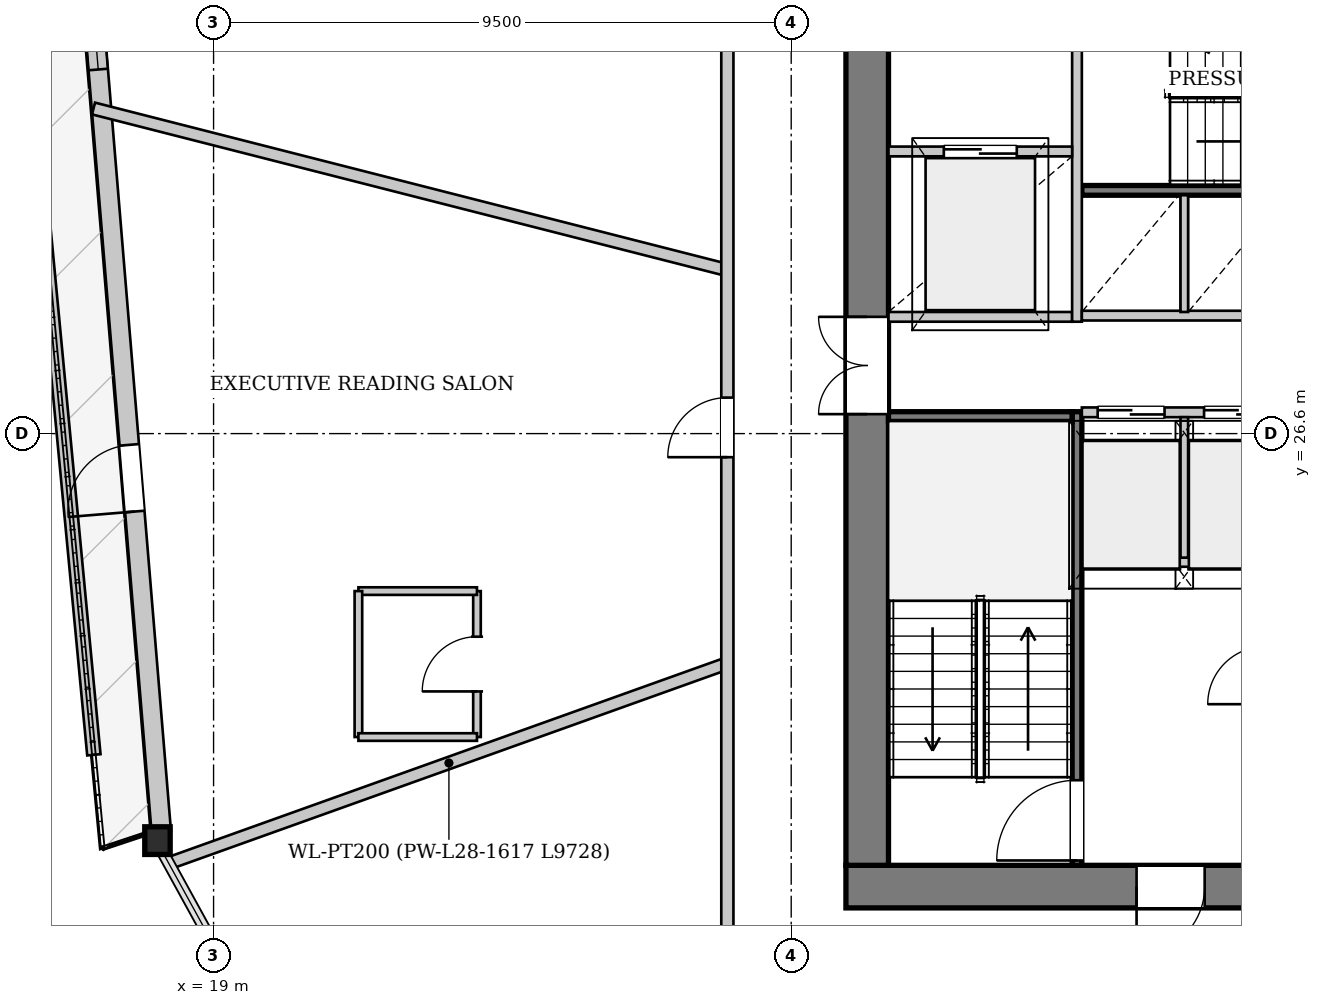
"""IFC4 building model, lengths in metres.
Left out: names, types, materials, properties, quantities, classifications, styles, units other than length and angle.
Written with IfcOpenShell. Run it as: python <this file> out.ifc"""

import sys

from ifc_helpers import new_model, si_unit, direction, frame, frame_2d, origin, origin_2d, place, context, subcontext, project, spatial, rectangle, i_section, extrude, source, transform, mapped, element, fill, save


model = new_model("IFC4")
c1 = context("Model", 3, precision=1e-05, world=origin(), true_north=direction((0.0, 1.0)))
c2 = subcontext(c1, "Body", "Model", "MODEL_VIEW")
j1 = project(units=[si_unit("LENGTHUNIT", "METRE"), si_unit("PLANEANGLEUNIT", "RADIAN")], contexts=[c1])
p1 = place(None, origin())
s1 = spatial("IfcSite", under=j1, at=p1, CompositionType="ELEMENT")
p2 = place(p1, origin())
s2 = spatial("IfcBuilding", under=s1, at=p2, CompositionType="ELEMENT")
p3 = place(p2, frame((0.0, 0.0, 109.25)))
s3 = spatial("IfcBuildingStorey", under=s2, at=p3, CompositionType="ELEMENT", Elevation=109.25)
m1 = source(origin(), c2, "Body", "SweptSolid", [
    extrude(i_section(OverallWidth=0.418, OverallDepth=0.455, WebThickness=0.038, FlangeThickness=0.059, at=origin_2d()), origin(), (0.0, 0.0, 1.0), 3.403),
])
p4 = place(p3, frame((17.98, 20.048, 0.0), z_axis=(0.057259482904, -0.083449597264, 0.994865577017), x_axis=(0.824558750738, 0.565776339715, 0.0)))
e1 = element("IfcColumn", 1, at=p4, inside=s3, PredefinedType="COLUMN", context=c2, shape_type="MappedRepresentation", body=[
    mapped(m1, transform((0.0, 0.0, 0.0), x_axis=(1.0, 0.0, 0.0), y_axis=(0.0, 1.0, 0.0), z_axis=(0.0, 0.0, 1.0), scale=1.0)),
])
p5 = place(p3, frame((18.139, 20.062, 0.0), z_axis=(0.0, 0.0, 1.0), x_axis=(-0.082462696948, 0.996594151905, 0.0)))
e2 = element("IfcWall", 2, at=p5, inside=s3, PredefinedType="SOLIDWALL", context=c2, shape_type="SweptSolid", body=[
    extrude(rectangle(XDim=18.202, YDim=0.32, at=frame_2d((9.101, 0.0))), origin(), (0.0, 0.0, 1.0), 2.692),
])
p6 = place(p5, frame((5.275, 0.0, 0.0)))
e3 = element("IfcOpeningElement", 3, at=p6, cuts=e2, PredefinedType="OPENING", context=c2, shape_type="SweptSolid", body=[
    extrude(rectangle(XDim=1.1, YDim=2.3, at=frame_2d((0.55, 1.15))), frame((0.0, 0.17, 0.0), z_axis=(0.0, -1.0, 0.0), x_axis=(1.0, 0.0, 0.0)), (0.0, 0.0, 1.0), 0.34),
])
p7 = place(p5, frame((12.569, 0.0, 0.372)))
e4 = element("IfcOpeningElement", 4, at=p7, cuts=e2, PredefinedType="OPENING", context=c2, shape_type="SweptSolid", body=[
    extrude(rectangle(XDim=1.8, YDim=2.2, at=frame_2d((0.9, 1.1))), frame((0.0, 0.17, 0.0), z_axis=(0.0, -1.0, 0.0), x_axis=(1.0, 0.0, 0.0)), (0.0, 0.0, 1.0), 0.34),
])
p8 = place(p3, frame((15.501, 37.451, 0.0), z_axis=(0.0, 0.0, 1.0), x_axis=(0.094440121339, -0.995530543721, 0.0)))
e5 = element("IfcWall", 5, at=p8, inside=s3, PredefinedType="PARAPET", context=c2, shape_type="SweptSolid", body=[
    extrude(rectangle(XDim=16.206, YDim=0.22, at=frame_2d((8.103, 0.0))), origin(), (0.0, 0.0, 1.0), 0.3),
])
p9 = place(p3, frame((46.6, 19.15, 0.0), z_axis=(0.0, 0.0, 1.0), x_axis=(-1.0, 0.0, 0.0)))
e6 = element("IfcWall", 6, at=p9, inside=s3, PredefinedType="SHEAR", context=c2, shape_type="SweptSolid", body=[
    extrude(rectangle(XDim=17.2, YDim=0.7, at=frame_2d((8.6, 0.0))), origin(), (0.0, 0.0, 1.0), 3.3),
])
p10 = place(p9, frame((4.8, 0.0, 0.0)))
e7 = element("IfcOpeningElement", 7, at=p10, cuts=e6, PredefinedType="OPENING", context=c2, shape_type="SweptSolid", body=[
    extrude(rectangle(XDim=1.12, YDim=2.25, at=frame_2d((0.56, 1.125))), frame((0.0, 0.36, 0.0), z_axis=(0.0, -1.0, 0.0), x_axis=(1.0, 0.0, 0.0)), (0.0, 0.0, 1.0), 0.72),
])
p11 = place(p9, frame((11.3, 0.0, 0.0)))
e8 = element("IfcOpeningElement", 8, at=p11, cuts=e6, PredefinedType="OPENING", context=c2, shape_type="SweptSolid", body=[
    extrude(rectangle(XDim=1.12, YDim=2.25, at=frame_2d((0.56, 1.125))), frame((0.0, 0.36, 0.0), z_axis=(0.0, -1.0, 0.0), x_axis=(1.0, 0.0, 0.0)), (0.0, 0.0, 1.0), 0.72),
])
p12 = place(p3, frame((29.75, 19.5, 0.0), z_axis=(0.0, 0.0, 1.0), x_axis=(0.0, 1.0, 0.0)))
e9 = element("IfcWall", 9, at=p12, inside=s3, PredefinedType="SHEAR", context=c2, shape_type="SweptSolid", body=[
    extrude(rectangle(XDim=14.2, YDim=0.7, at=frame_2d((7.1, 0.0))), origin(), (0.0, 0.0, 1.0), 3.3),
])
p13 = place(p12, frame((7.42, 0.0, 0.0)))
e10 = element("IfcOpeningElement", 10, at=p13, cuts=e9, PredefinedType="OPENING", context=c2, shape_type="SweptSolid", body=[
    extrude(rectangle(XDim=1.6, YDim=2.2, at=frame_2d((0.8, 1.1))), frame((0.0, 0.36, 0.0), z_axis=(0.0, -1.0, 0.0), x_axis=(1.0, 0.0, 0.0)), (0.0, 0.0, 1.0), 0.72),
])
p14 = place(p3, frame((33.2, 19.5, 0.0), z_axis=(0.0, 0.0, 1.0), x_axis=(0.0, 1.0, 0.0)))
e11 = element("IfcWall", 11, at=p14, inside=s3, PredefinedType="PARTITIONING", context=c2, shape_type="SweptSolid", body=[
    extrude(rectangle(XDim=7.46, YDim=0.16, at=frame_2d((3.73, 0.0))), origin(), (0.0, 0.0, 1.0), 3.3),
])
p15 = place(p14, frame((0.08, 0.0, 0.0)))
e12 = element("IfcOpeningElement", 12, at=p15, cuts=e11, PredefinedType="OPENING", context=c2, shape_type="SweptSolid", body=[
    extrude(rectangle(XDim=1.32, YDim=2.2, at=frame_2d((0.66, 1.1))), frame((0.0, 0.09, 0.0), z_axis=(0.0, -1.0, 0.0), x_axis=(1.0, 0.0, 0.0)), (0.0, 0.0, 1.0), 0.18),
])
p16 = place(p3, frame((30.1, 26.88, 0.0), z_axis=(0.0, 0.0, 1.0), x_axis=(1.0, 0.0, 0.0)))
e13 = element("IfcWall", 13, at=p16, inside=s3, PredefinedType="PARTITIONING", context=c2, shape_type="SweptSolid", body=[
    extrude(rectangle(XDim=3.02, YDim=0.16, at=frame_2d((1.51, 0.0))), origin(), (0.0, 0.0, 1.0), 3.3),
])
p17 = place(p3, frame((33.28, 30.6, 0.0), z_axis=(0.0, 0.0, 1.0), x_axis=(1.0, 0.0, 0.0)))
e14 = element("IfcWall", 14, at=p17, inside=s3, PredefinedType="PARTITIONING", context=c2, shape_type="SweptSolid", body=[
    extrude(rectangle(XDim=7.3, YDim=0.16, at=frame_2d((3.65, 0.0))), origin(), (0.0, 0.0, 1.0), 3.3),
])
p18 = place(p3, frame((33.28, 24.49, 0.0), z_axis=(0.0, 0.0, 1.0), x_axis=(1.0, 0.0, 0.0)))
e15 = element("IfcWall", 15, at=p18, inside=s3, PredefinedType="PARTITIONING", context=c2, shape_type="SweptSolid", body=[
    extrude(rectangle(XDim=9.44, YDim=0.16, at=frame_2d((4.72, 0.0))), origin(), (0.0, 0.0, 1.0), 3.3),
])
p19 = place(p3, frame((30.1, 28.52, 0.0), z_axis=(0.0, 0.0, 1.0), x_axis=(1.0, 0.0, 0.0)))
e16 = element("IfcWall", 16, at=p19, inside=s3, PredefinedType="PARTITIONING", context=c2, shape_type="SweptSolid", body=[
    extrude(rectangle(XDim=3.02, YDim=0.16, at=frame_2d((1.51, 0.0))), origin(), (0.0, 0.0, 1.0), 3.3),
])
p20 = place(p3, frame((33.2, 28.44, 0.0), z_axis=(0.0, 0.0, 1.0), x_axis=(0.0, 1.0, 0.0)))
e17 = element("IfcWall", 17, at=p20, inside=s3, PredefinedType="PARTITIONING", context=c2, shape_type="SweptSolid", body=[
    extrude(rectangle(XDim=5.26, YDim=0.16, at=frame_2d((2.63, 0.0))), origin(), (0.0, 0.0, 1.0), 3.3),
])
p21 = place(p3, frame((30.1, 31.24, 0.0), z_axis=(0.0, 0.0, 1.0), x_axis=(1.0, 0.0, 0.0)))
e18 = element("IfcWall", 18, at=p21, inside=s3, PredefinedType="PARTITIONING", context=c2, shape_type="SweptSolid", body=[
    extrude(rectangle(XDim=3.02, YDim=0.16, at=frame_2d((1.51, 0.0))), origin(), (0.0, 0.0, 1.0), 3.3),
])
p22 = place(p21, frame((0.91, 0.0, 0.0)))
e19 = element("IfcOpeningElement", 19, at=p22, cuts=e18, PredefinedType="OPENING", context=c2, shape_type="SweptSolid", body=[
    extrude(rectangle(XDim=1.2, YDim=2.2, at=frame_2d((0.6, 1.1))), frame((0.0, 0.09, 0.0), z_axis=(0.0, -1.0, 0.0), x_axis=(1.0, 0.0, 0.0)), (0.0, 0.0, 1.0), 0.18),
])
p23 = place(p3, frame((33.28, 26.95, 0.0), z_axis=(0.0, 0.0, 1.0), x_axis=(1.0, 0.0, 0.0)))
e20 = element("IfcWall", 20, at=p23, inside=s3, PredefinedType="PARTITIONING", context=c2, shape_type="SweptSolid", body=[
    extrude(rectangle(XDim=9.44, YDim=0.16, at=frame_2d((4.72, 0.0))), origin(), (0.0, 0.0, 1.0), 3.3),
])
p24 = place(p23, frame((0.26, 0.0, 0.0)))
e21 = element("IfcOpeningElement", 21, at=p24, cuts=e20, PredefinedType="OPENING", context=c2, shape_type="SweptSolid", body=[
    extrude(rectangle(XDim=1.1, YDim=2.2, at=frame_2d((0.55, 1.1))), frame((0.0, 0.09, 0.0), z_axis=(0.0, -1.0, 0.0), x_axis=(1.0, 0.0, 0.0)), (0.0, 0.0, 1.0), 0.18),
])
p25 = place(p23, frame((2.01, 0.0, 0.0)))
e22 = element("IfcOpeningElement", 22, at=p25, cuts=e20, PredefinedType="OPENING", context=c2, shape_type="SweptSolid", body=[
    extrude(rectangle(XDim=1.1, YDim=2.2, at=frame_2d((0.55, 1.1))), frame((0.0, 0.09, 0.0), z_axis=(0.0, -1.0, 0.0), x_axis=(1.0, 0.0, 0.0)), (0.0, 0.0, 1.0), 0.18),
])
p26 = place(p23, frame((3.76, 0.0, 0.0)))
e23 = element("IfcOpeningElement", 23, at=p26, cuts=e20, PredefinedType="OPENING", context=c2, shape_type="SweptSolid", body=[
    extrude(rectangle(XDim=1.1, YDim=2.2, at=frame_2d((0.55, 1.1))), frame((0.0, 0.09, 0.0), z_axis=(0.0, -1.0, 0.0), x_axis=(1.0, 0.0, 0.0)), (0.0, 0.0, 1.0), 0.18),
])
p27 = place(p23, frame((5.51, 0.0, 0.0)))
e24 = element("IfcOpeningElement", 24, at=p27, cuts=e20, PredefinedType="OPENING", context=c2, shape_type="SweptSolid", body=[
    extrude(rectangle(XDim=1.1, YDim=2.2, at=frame_2d((0.55, 1.1))), frame((0.0, 0.09, 0.0), z_axis=(0.0, -1.0, 0.0), x_axis=(1.0, 0.0, 0.0)), (0.0, 0.0, 1.0), 0.18),
])
p28 = place(p3, frame((34.965, 24.56, 0.0), z_axis=(0.0, 0.0, 1.0), x_axis=(0.0, 1.0, 0.0)))
e25 = element("IfcWall", 25, at=p28, inside=s3, PredefinedType="PARTITIONING", context=c2, shape_type="SweptSolid", body=[
    extrude(rectangle(XDim=2.31, YDim=0.125, at=frame_2d((1.155, 0.0))), origin(), (0.0, 0.0, 1.0), 3.3),
])
p29 = place(p3, frame((33.28, 28.54, 0.0), z_axis=(0.0, 0.0, 1.0), x_axis=(1.0, 0.0, 0.0)))
e26 = element("IfcWall", 26, at=p29, inside=s3, PredefinedType="PARTITIONING", context=c2, shape_type="SweptSolid", body=[
    extrude(rectangle(XDim=12.62, YDim=0.16, at=frame_2d((6.31, 0.0))), origin(), (0.0, 0.0, 1.0), 3.3),
])
p30 = place(p3, frame((34.965, 28.6, 0.0), z_axis=(0.0, 0.0, 1.0), x_axis=(0.0, 1.0, 0.0)))
e27 = element("IfcWall", 27, at=p30, inside=s3, PredefinedType="PARTITIONING", context=c2, shape_type="SweptSolid", body=[
    extrude(rectangle(XDim=1.92, YDim=0.125, at=frame_2d((0.96, 0.0))), origin(), (0.0, 0.0, 1.0), 3.3),
])
p31 = place(p3, frame((27.45, 22.823, 0.0), z_axis=(0.0, 0.0, 1.0), x_axis=(-0.941467347451, -0.337104188174, 0.0)))
e28 = element("IfcWall", 28, at=p31, inside=s3, PredefinedType="PARTITIONING", context=c2, shape_type="SweptSolid", body=[
    extrude(rectangle(XDim=9.728, YDim=0.2, at=frame_2d((4.864, 0.0))), origin(), (0.0, 0.0, 1.0), 2.785),
])
p32 = place(p3, frame((27.45, 29.289, 0.0), z_axis=(0.0, 0.0, 1.0), x_axis=(-0.96902028645, 0.246981141887, 0.0)))
e29 = element("IfcWall", 29, at=p32, inside=s3, PredefinedType="PARTITIONING", context=c2, shape_type="SweptSolid", body=[
    extrude(rectangle(XDim=10.758, YDim=0.2, at=frame_2d((5.379, 0.0))), origin(), (0.0, 0.0, 1.0), 3.3),
])
p33 = place(p3, frame((23.332, 21.61, 0.0), z_axis=(0.0, 0.0, 1.0), x_axis=(0.0, 1.0, 0.0)))
e30 = element("IfcWall", 30, at=p33, inside=s3, PredefinedType="PARTITIONING", context=c2, shape_type="SweptSolid", body=[
    extrude(rectangle(XDim=2.4, YDim=0.125, at=frame_2d((1.2, 0.0))), origin(), (0.0, 0.0, 1.0), 3.3),
])
p34 = place(p33, frame((0.75, 0.0, 0.0)))
e31 = element("IfcOpeningElement", 31, at=p34, cuts=e30, PredefinedType="OPENING", context=c2, shape_type="SweptSolid", body=[
    extrude(rectangle(XDim=0.9, YDim=2.1, at=frame_2d((0.45, 1.05))), frame((0.0, 0.073, 0.0), z_axis=(0.0, -1.0, 0.0), x_axis=(1.0, 0.0, 0.0)), (0.0, 0.0, 1.0), 0.145),
])
p35 = place(p3, frame((23.332, 24.01, 0.0), z_axis=(0.0, 0.0, 1.0), x_axis=(-1.0, 0.0, 0.0)))
e32 = element("IfcWall", 32, at=p35, inside=s3, PredefinedType="PARTITIONING", context=c2, shape_type="SweptSolid", body=[
    extrude(rectangle(XDim=1.95, YDim=0.125, at=frame_2d((0.975, 0.0))), origin(), (0.0, 0.0, 1.0), 3.3),
])
p36 = place(p3, frame((21.382, 24.01, 0.0), z_axis=(0.0, 0.0, 1.0), x_axis=(0.0, -1.0, 0.0)))
e33 = element("IfcWall", 33, at=p36, inside=s3, PredefinedType="PARTITIONING", context=c2, shape_type="SweptSolid", body=[
    extrude(rectangle(XDim=2.4, YDim=0.125, at=frame_2d((1.2, 0.0))), origin(), (0.0, 0.0, 1.0), 3.3),
])
p37 = place(p3, frame((21.382, 21.61, 0.0), z_axis=(0.0, 0.0, 1.0), x_axis=(1.0, 0.0, 0.0)))
e34 = element("IfcWall", 34, at=p37, inside=s3, PredefinedType="PARTITIONING", context=c2, shape_type="SweptSolid", body=[
    extrude(rectangle(XDim=1.95, YDim=0.125, at=frame_2d((0.975, 0.0))), origin(), (0.0, 0.0, 1.0), 2.785),
])
p38 = place(p3, frame((27.45, 16.85, 0.0), z_axis=(0.0, 0.0, 1.0), x_axis=(0.0, 1.0, 0.0)))
e35 = element("IfcWall", 35, at=p38, inside=s3, PredefinedType="PARTITIONING", context=c2, shape_type="SweptSolid", body=[
    extrude(rectangle(XDim=19.5, YDim=0.2, at=frame_2d((9.75, 0.0))), origin(), (0.0, 0.0, 1.0), 3.3),
])
p39 = place(p38, frame((0.3, 0.0, 0.0)))
e36 = element("IfcOpeningElement", 36, at=p39, cuts=e35, PredefinedType="OPENING", context=c2, shape_type="SweptSolid", body=[
    extrude(rectangle(XDim=0.98, YDim=2.15, at=frame_2d((0.49, 1.075))), frame((0.0, 0.11, 0.0), z_axis=(0.0, -1.0, 0.0), x_axis=(1.0, 0.0, 0.0)), (0.0, 0.0, 1.0), 0.22),
])
p40 = place(p38, frame((16.768, 0.0, 0.0)))
e37 = element("IfcOpeningElement", 37, at=p40, cuts=e35, PredefinedType="OPENING", context=c2, shape_type="SweptSolid", body=[
    extrude(rectangle(XDim=0.98, YDim=2.15, at=frame_2d((0.49, 1.075))), frame((0.0, 0.11, 0.0), z_axis=(0.0, -1.0, 0.0), x_axis=(1.0, 0.0, 0.0)), (0.0, 0.0, 1.0), 0.22),
])
p41 = place(p38, frame((9.362, 0.0, 0.0)))
e38 = element("IfcOpeningElement", 38, at=p41, cuts=e35, PredefinedType="OPENING", context=c2, shape_type="SweptSolid", body=[
    extrude(rectangle(XDim=0.98, YDim=2.15, at=frame_2d((0.49, 1.075))), frame((0.0, 0.11, 0.0), z_axis=(0.0, -1.0, 0.0), x_axis=(1.0, 0.0, 0.0)), (0.0, 0.0, 1.0), 0.22),
])
m2 = source(origin(), c2, "Body", "SweptSolid", [
    extrude(rectangle(XDim=1.1, YDim=2.3, at=frame_2d((0.55, 1.15))), frame((0.0, 0.025, 0.0), z_axis=(0.0, -1.0, 0.0), x_axis=(1.0, 0.0, 0.0)), (0.0, 0.0, 1.0), 0.05),
])
p42 = place(p6, origin())
e39 = element("IfcDoor", 39, at=p42, inside=s3, OperationType="SINGLE_SWING_LEFT", PredefinedType="DOOR", context=c2, shape_type="MappedRepresentation", body=[
    mapped(m2, transform((0.0, 0.0, 0.0), x_axis=(1.0, 0.0, 0.0), y_axis=(0.0, 1.0, 0.0), z_axis=(0.0, 0.0, 1.0), scale=1.0)),
])
fill(e3, e39)
m3 = source(origin(), c2, "Body", "SweptSolid", [
    extrude(rectangle(XDim=1.8, YDim=2.2, at=frame_2d((0.9, 1.1))), frame((0.0, 0.03, 0.0), z_axis=(0.0, -1.0, 0.0), x_axis=(1.0, 0.0, 0.0)), (0.0, 0.0, 1.0), 0.06),
])
p43 = place(p7, origin())
e40 = element("IfcWindow", 40, at=p43, inside=s3, PartitioningType="SINGLE_PANEL", PredefinedType="WINDOW", context=c2, shape_type="MappedRepresentation", body=[
    mapped(m3, transform((0.0, 0.0, 0.0), x_axis=(1.0, 0.0, 0.0), y_axis=(0.0, 1.0, 0.0), z_axis=(0.0, 0.0, 1.0), scale=1.0)),
])
fill(e4, e40)
m4 = source(origin(), c2, "Body", "SweptSolid", [
    extrude(rectangle(XDim=1.12, YDim=2.25, at=frame_2d((0.56, 1.125))), frame((0.0, 0.025, 0.0), z_axis=(0.0, -1.0, 0.0), x_axis=(1.0, 0.0, 0.0)), (0.0, 0.0, 1.0), 0.05),
])
p44 = place(p11, origin())
e41 = element("IfcDoor", 41, at=p44, inside=s3, OperationType="SINGLE_SWING_RIGHT", PredefinedType="DOOR", context=c2, shape_type="MappedRepresentation", body=[
    mapped(m4, transform((0.0, 0.0, 0.0), x_axis=(1.0, 0.0, 0.0), y_axis=(0.0, 1.0, 0.0), z_axis=(0.0, 0.0, 1.0), scale=1.0)),
])
fill(e8, e41)
m5 = source(origin(), c2, "Body", "SweptSolid", [
    extrude(rectangle(XDim=1.6, YDim=2.2, at=frame_2d((0.8, 1.1))), frame((0.0, 0.025, 0.0), z_axis=(0.0, -1.0, 0.0), x_axis=(1.0, 0.0, 0.0)), (0.0, 0.0, 1.0), 0.05),
])
p45 = place(p13, origin())
e42 = element("IfcDoor", 42, at=p45, inside=s3, OperationType="DOUBLE_DOOR_SINGLE_SWING", PredefinedType="DOOR", context=c2, shape_type="MappedRepresentation", body=[
    mapped(m5, transform((0.0, 0.0, 0.0), x_axis=(1.0, 0.0, 0.0), y_axis=(0.0, 1.0, 0.0), z_axis=(0.0, 0.0, 1.0), scale=1.0)),
])
fill(e10, e42)
m6 = source(origin(), c2, "Body", "SweptSolid", [
    extrude(rectangle(XDim=1.32, YDim=2.2, at=frame_2d((0.66, 1.1))), frame((0.0, 0.025, 0.0), z_axis=(0.0, -1.0, 0.0), x_axis=(1.0, 0.0, 0.0)), (0.0, 0.0, 1.0), 0.05),
])
p46 = place(p15, origin())
e43 = element("IfcDoor", 43, at=p46, inside=s3, OperationType="SINGLE_SWING_LEFT", PredefinedType="DOOR", context=c2, shape_type="MappedRepresentation", body=[
    mapped(m6, transform((0.0, 0.0, 0.0), x_axis=(1.0, 0.0, 0.0), y_axis=(0.0, 1.0, 0.0), z_axis=(0.0, 0.0, 1.0), scale=1.0)),
])
fill(e12, e43)
m7 = source(origin(), c2, "Body", "SweptSolid", [
    extrude(rectangle(XDim=1.2, YDim=2.2, at=frame_2d((0.6, 1.1))), frame((0.0, 0.025, 0.0), z_axis=(0.0, -1.0, 0.0), x_axis=(1.0, 0.0, 0.0)), (0.0, 0.0, 1.0), 0.05),
])
p47 = place(p22, origin())
e44 = element("IfcDoor", 44, at=p47, inside=s3, OperationType="DOUBLE_DOOR_SLIDING", PredefinedType="DOOR", context=c2, shape_type="MappedRepresentation", body=[
    mapped(m7, transform((0.0, 0.0, 0.0), x_axis=(1.0, 0.0, 0.0), y_axis=(0.0, 1.0, 0.0), z_axis=(0.0, 0.0, 1.0), scale=1.0)),
])
fill(e19, e44)
m8 = source(origin(), c2, "Body", "SweptSolid", [
    extrude(rectangle(XDim=1.1, YDim=2.2, at=frame_2d((0.55, 1.1))), frame((0.0, 0.025, 0.0), z_axis=(0.0, -1.0, 0.0), x_axis=(1.0, 0.0, 0.0)), (0.0, 0.0, 1.0), 0.05),
])
p48 = place(p24, origin())
e45 = element("IfcDoor", 45, at=p48, inside=s3, OperationType="DOUBLE_DOOR_SLIDING", PredefinedType="DOOR", context=c2, shape_type="MappedRepresentation", body=[
    mapped(m8, transform((0.0, 0.0, 0.0), x_axis=(1.0, 0.0, 0.0), y_axis=(0.0, 1.0, 0.0), z_axis=(0.0, 0.0, 1.0), scale=1.0)),
])
fill(e21, e45)
p49 = place(p25, origin())
e46 = element("IfcDoor", 46, at=p49, inside=s3, OperationType="DOUBLE_DOOR_SLIDING", PredefinedType="DOOR", context=c2, shape_type="MappedRepresentation", body=[
    mapped(m8, transform((0.0, 0.0, 0.0), x_axis=(1.0, 0.0, 0.0), y_axis=(0.0, 1.0, 0.0), z_axis=(0.0, 0.0, 1.0), scale=1.0)),
])
fill(e22, e46)
m9 = source(origin(), c2, "Body", "SweptSolid", [
    extrude(rectangle(XDim=0.9, YDim=2.1, at=frame_2d((0.45, 1.05))), frame((0.0, 0.025, 0.0), z_axis=(0.0, -1.0, 0.0), x_axis=(1.0, 0.0, 0.0)), (0.0, 0.0, 1.0), 0.05),
])
p50 = place(p34, origin())
e47 = element("IfcDoor", 47, at=p50, inside=s3, OperationType="SINGLE_SWING_LEFT", PredefinedType="DOOR", context=c2, shape_type="MappedRepresentation", body=[
    mapped(m9, transform((0.0, 0.0, 0.0), x_axis=(1.0, 0.0, 0.0), y_axis=(0.0, 1.0, 0.0), z_axis=(0.0, 0.0, 1.0), scale=1.0)),
])
fill(e31, e47)
m10 = source(origin(), c2, "Body", "SweptSolid", [
    extrude(rectangle(XDim=0.98, YDim=2.15, at=frame_2d((0.49, 1.075))), frame((0.0, 0.025, 0.0), z_axis=(0.0, -1.0, 0.0), x_axis=(1.0, 0.0, 0.0)), (0.0, 0.0, 1.0), 0.05),
])
p51 = place(p41, origin())
e48 = element("IfcDoor", 48, at=p51, inside=s3, OperationType="SINGLE_SWING_LEFT", PredefinedType="DOOR", context=c2, shape_type="MappedRepresentation", body=[
    mapped(m10, transform((0.0, 0.0, 0.0), x_axis=(1.0, 0.0, 0.0), y_axis=(0.0, 1.0, 0.0), z_axis=(0.0, 0.0, 1.0), scale=1.0)),
])
fill(e38, e48)
save(model, sys.argv[1])
